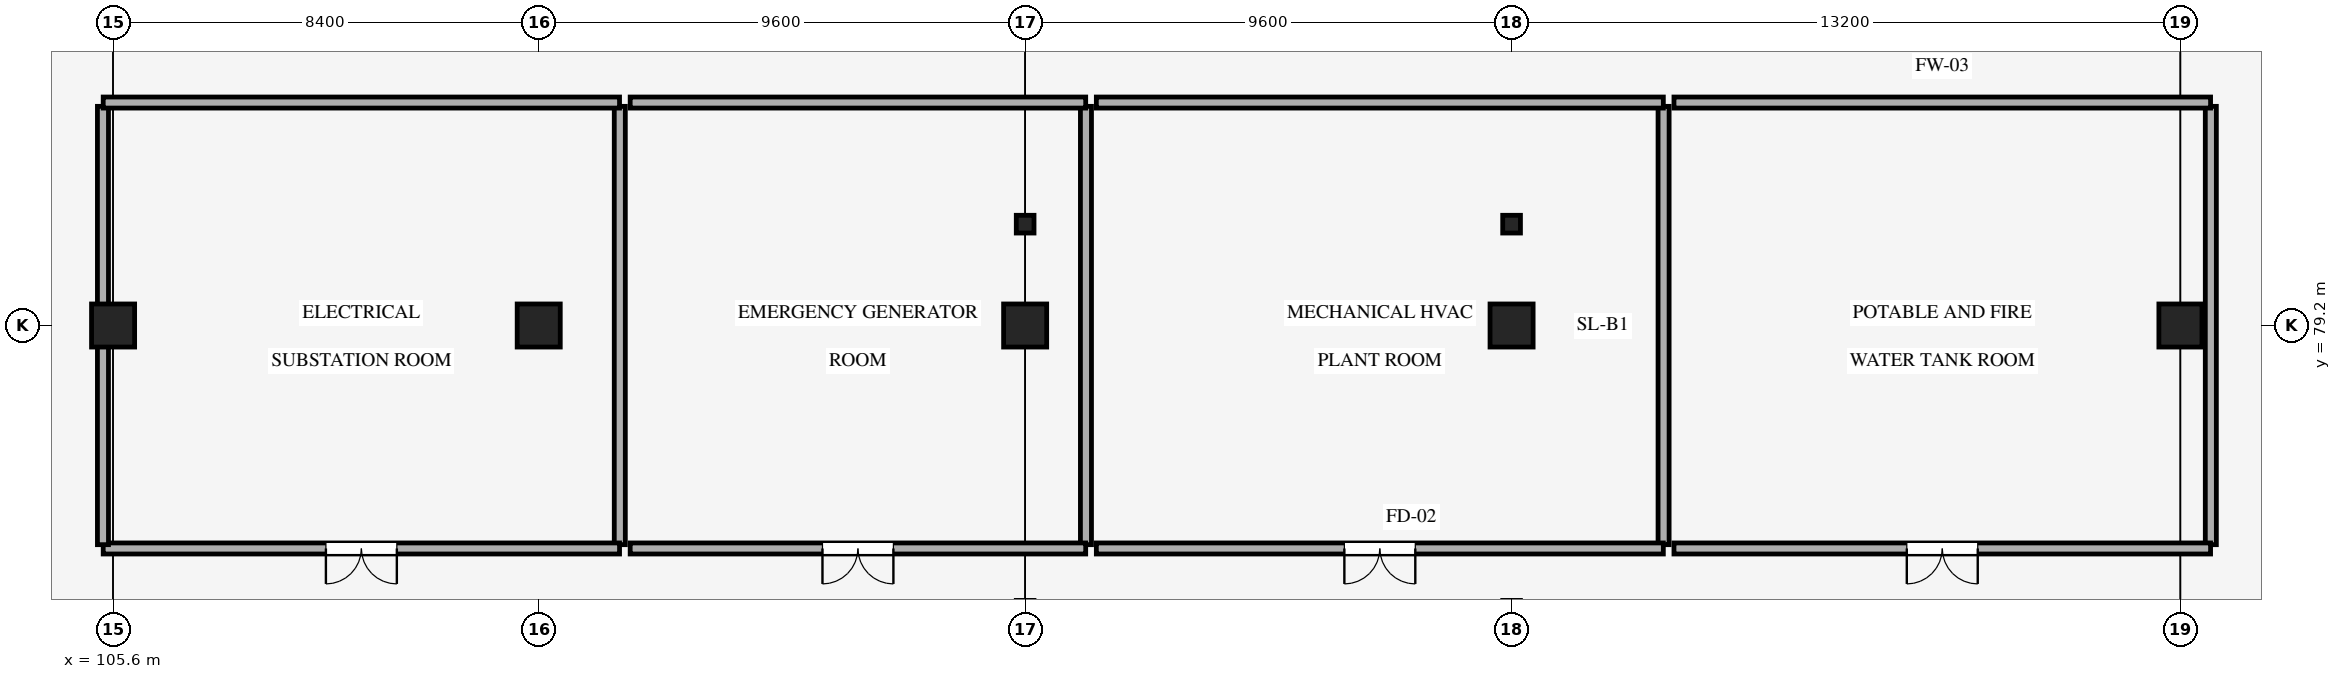
"""IFC4 building model, lengths in metres.
Left out: names, types, materials, properties, quantities, classifications, styles, units other than length and angle.
Written with IfcOpenShell. Run it as: python <this file> out.ifc"""

import sys

from ifc_helpers import new_model, si_unit, direction, frame, frame_2d, origin, origin_2d, place, context, subcontext, project, spatial, rectangle, hollow_rectangle, extrude, element, fill, save


model = new_model("IFC4")
c1 = context("Model", 3, precision=1e-05, world=origin(), true_north=direction((0.0, 1.0)))
c2 = subcontext(c1, "Body", "Model", "MODEL_VIEW")
j1 = project(units=[si_unit("LENGTHUNIT", "METRE"), si_unit("PLANEANGLEUNIT", "RADIAN")], contexts=[c1])
p1 = place(None, origin())
s1 = spatial("IfcSite", under=j1, at=p1, CompositionType="ELEMENT")
p2 = place(p1, origin())
s2 = spatial("IfcBuilding", under=s1, at=p2, CompositionType="ELEMENT")
p3 = place(p2, frame((0.0, 0.0, -4.8)))
s3 = spatial("IfcBuildingStorey", under=s2, at=p3, CompositionType="ELEMENT", Elevation=-4.8)
for number, where, z_axis, x_axis in (
    (1, (105.6, 79.2, 0.0), (0.0, 0.0, 1.0), (1.0, 0.0, 0.0)),
    (2, (114.0, 79.2, 0.0), (0.0, 0.0, 1.0), (1.0, 0.0, 0.0)),
    (3, (123.6, 79.2, 0.0), (0.0, 0.0, 1.0), (1.0, 0.0, 0.0)),
):
    element("IfcColumn", number, at=place(p3, frame(where, z_axis=z_axis, x_axis=x_axis)), inside=s3, PredefinedType="COLUMN", context=c2, shape_type="SweptSolid", body=[
        extrude(rectangle(XDim=0.85, YDim=0.85, at=origin_2d()), origin(), (0.0, 0.0, 1.0), 4.8),
    ])
p4 = place(p3, frame((123.6, 81.2, 0.0), z_axis=(0.0, 0.0, 1.0), x_axis=(1.0, 0.0, 0.0)))
e4 = element("IfcColumn", 4, at=p4, inside=s3, PredefinedType="COLUMN", context=c2, shape_type="SweptSolid", body=[
    extrude(hollow_rectangle(XDim=0.35, YDim=0.35, WallThickness=0.012, InnerFilletRadius=0.012, OuterFilletRadius=0.024, at=origin_2d()), origin(), (0.0, 0.0, 1.0), 4.8),
])
p5 = place(p3, frame((133.2, 79.2, 0.0), z_axis=(0.0, 0.0, 1.0), x_axis=(1.0, 0.0, 0.0)))
e5 = element("IfcColumn", 5, at=p5, inside=s3, PredefinedType="COLUMN", context=c2, shape_type="SweptSolid", body=[
    extrude(rectangle(XDim=0.85, YDim=0.85, at=origin_2d()), origin(), (0.0, 0.0, 1.0), 4.8),
])
p6 = place(p3, frame((133.2, 81.2, 0.0), z_axis=(0.0, 0.0, 1.0), x_axis=(1.0, 0.0, 0.0)))
e6 = element("IfcColumn", 6, at=p6, inside=s3, PredefinedType="COLUMN", context=c2, shape_type="SweptSolid", body=[
    extrude(hollow_rectangle(XDim=0.35, YDim=0.35, WallThickness=0.012, InnerFilletRadius=0.012, OuterFilletRadius=0.024, at=origin_2d()), origin(), (0.0, 0.0, 1.0), 4.8),
])
p7 = place(p3, frame((146.4, 79.2, 0.0), z_axis=(0.0, 0.0, 1.0), x_axis=(1.0, 0.0, 0.0)))
e7 = element("IfcColumn", 7, at=p7, inside=s3, PredefinedType="COLUMN", context=c2, shape_type="SweptSolid", body=[
    extrude(rectangle(XDim=0.85, YDim=0.85, at=origin_2d()), origin(), (0.0, 0.0, 1.0), 4.8),
])
p8 = place(p3, frame((115.6, 83.525, 0.0), z_axis=(0.0, 0.0, 1.0), x_axis=(0.0, -1.0, 0.0)))
e8 = element("IfcWall", 8, at=p8, inside=s3, PredefinedType="STANDARD", context=c2, shape_type="SweptSolid", body=[
    extrude(rectangle(XDim=8.65, YDim=0.218, at=frame_2d((4.325, 0.0))), origin(), (0.0, 0.0, 1.0), 3.5),
])
p9 = place(p3, frame((115.595, 74.8, 0.0), z_axis=(0.0, 0.0, 1.0), x_axis=(-1.0, 0.0, 0.0)))
e9 = element("IfcWall", 9, at=p9, inside=s3, PredefinedType="STANDARD", context=c2, shape_type="SweptSolid", body=[
    extrude(rectangle(XDim=10.19, YDim=0.218, at=frame_2d((5.095, 0.0))), origin(), (0.0, 0.0, 1.0), 4.45),
])
p10 = place(p9, frame((4.395, 0.0, 0.0)))
e10 = element("IfcOpeningElement", 10, at=p10, cuts=e9, PredefinedType="OPENING", context=c2, shape_type="SweptSolid", body=[
    extrude(rectangle(XDim=1.4, YDim=2.2, at=frame_2d((0.7, 1.1))), frame((0.0, 0.119, 0.0), z_axis=(0.0, -1.0, 0.0), x_axis=(1.0, 0.0, 0.0)), (0.0, 0.0, 1.0), 0.238),
])
p11 = place(p3, frame((105.4, 74.875, 0.0), z_axis=(0.0, 0.0, 1.0), x_axis=(0.0, 1.0, 0.0)))
e11 = element("IfcWall", 11, at=p11, inside=s3, PredefinedType="STANDARD", context=c2, shape_type="SweptSolid", body=[
    extrude(rectangle(XDim=8.65, YDim=0.218, at=frame_2d((4.325, 0.0))), origin(), (0.0, 0.0, 1.0), 3.65),
])
p12 = place(p3, frame((105.405, 83.6, 0.0), z_axis=(0.0, 0.0, 1.0), x_axis=(1.0, 0.0, 0.0)))
e12 = element("IfcWall", 12, at=p12, inside=s3, PredefinedType="STANDARD", context=c2, shape_type="SweptSolid", body=[
    extrude(rectangle(XDim=10.19, YDim=0.218, at=frame_2d((5.095, 0.0))), origin(), (0.0, 0.0, 1.0), 4.45),
])
p13 = place(p3, frame((124.8, 83.525, 0.0), z_axis=(0.0, 0.0, 1.0), x_axis=(0.0, -1.0, 0.0)))
e13 = element("IfcWall", 13, at=p13, inside=s3, PredefinedType="STANDARD", context=c2, shape_type="SweptSolid", body=[
    extrude(rectangle(XDim=8.65, YDim=0.218, at=frame_2d((4.325, 0.0))), origin(), (0.0, 0.0, 1.0), 4.185),
])
p14 = place(p3, frame((124.795, 74.8, 0.0), z_axis=(0.0, 0.0, 1.0), x_axis=(-1.0, 0.0, 0.0)))
e14 = element("IfcWall", 14, at=p14, inside=s3, PredefinedType="STANDARD", context=c2, shape_type="SweptSolid", body=[
    extrude(rectangle(XDim=8.99, YDim=0.218, at=frame_2d((4.495, 0.0))), origin(), (0.0, 0.0, 1.0), 3.735),
])
p15 = place(p14, frame((3.795, 0.0, 0.0)))
e15 = element("IfcOpeningElement", 15, at=p15, cuts=e14, PredefinedType="OPENING", context=c2, shape_type="SweptSolid", body=[
    extrude(rectangle(XDim=1.4, YDim=2.2, at=frame_2d((0.7, 1.1))), frame((0.0, 0.119, 0.0), z_axis=(0.0, -1.0, 0.0), x_axis=(1.0, 0.0, 0.0)), (0.0, 0.0, 1.0), 0.238),
])
p16 = place(p3, frame((115.805, 83.6, 0.0), z_axis=(0.0, 0.0, 1.0), x_axis=(1.0, 0.0, 0.0)))
e16 = element("IfcWall", 16, at=p16, inside=s3, PredefinedType="STANDARD", context=c2, shape_type="SweptSolid", body=[
    extrude(rectangle(XDim=8.99, YDim=0.218, at=frame_2d((4.495, 0.0))), origin(), (0.0, 0.0, 1.0), 3.735),
])
p17 = place(p3, frame((136.2, 83.525, 0.0), z_axis=(0.0, 0.0, 1.0), x_axis=(0.0, -1.0, 0.0)))
e17 = element("IfcWall", 17, at=p17, inside=s3, PredefinedType="STANDARD", context=c2, shape_type="SweptSolid", body=[
    extrude(rectangle(XDim=8.65, YDim=0.218, at=frame_2d((4.325, 0.0))), origin(), (0.0, 0.0, 1.0), 3.5),
])
p18 = place(p3, frame((136.195, 74.8, 0.0), z_axis=(0.0, 0.0, 1.0), x_axis=(-1.0, 0.0, 0.0)))
e18 = element("IfcWall", 18, at=p18, inside=s3, PredefinedType="STANDARD", context=c2, shape_type="SweptSolid", body=[
    extrude(rectangle(XDim=11.19, YDim=0.218, at=frame_2d((5.595, 0.0))), origin(), (0.0, 0.0, 1.0), 3.735),
])
p19 = place(p18, frame((4.895, 0.0, 0.0)))
e19 = element("IfcOpeningElement", 19, at=p19, cuts=e18, PredefinedType="OPENING", context=c2, shape_type="SweptSolid", body=[
    extrude(rectangle(XDim=1.4, YDim=2.2, at=frame_2d((0.7, 1.1))), frame((0.0, 0.119, 0.0), z_axis=(0.0, -1.0, 0.0), x_axis=(1.0, 0.0, 0.0)), (0.0, 0.0, 1.0), 0.238),
])
p20 = place(p3, frame((125.005, 83.6, 0.0), z_axis=(0.0, 0.0, 1.0), x_axis=(1.0, 0.0, 0.0)))
e20 = element("IfcWall", 20, at=p20, inside=s3, PredefinedType="STANDARD", context=c2, shape_type="SweptSolid", body=[
    extrude(rectangle(XDim=11.19, YDim=0.218, at=frame_2d((5.595, 0.0))), origin(), (0.0, 0.0, 1.0), 3.735),
])
p21 = place(p3, frame((147.0, 83.525, 0.0), z_axis=(0.0, 0.0, 1.0), x_axis=(0.0, -1.0, 0.0)))
e21 = element("IfcWall", 21, at=p21, inside=s3, PredefinedType="STANDARD", context=c2, shape_type="SweptSolid", body=[
    extrude(rectangle(XDim=8.65, YDim=0.218, at=frame_2d((4.325, 0.0))), origin(), (0.0, 0.0, 1.0), 4.45),
])
p22 = place(p3, frame((146.995, 74.8, 0.0), z_axis=(0.0, 0.0, 1.0), x_axis=(-1.0, 0.0, 0.0)))
e22 = element("IfcWall", 22, at=p22, inside=s3, PredefinedType="STANDARD", context=c2, shape_type="SweptSolid", body=[
    extrude(rectangle(XDim=10.59, YDim=0.218, at=frame_2d((5.295, 0.0))), origin(), (0.0, 0.0, 1.0), 4.45),
])
p23 = place(p22, frame((4.595, 0.0, 0.0)))
e23 = element("IfcOpeningElement", 23, at=p23, cuts=e22, PredefinedType="OPENING", context=c2, shape_type="SweptSolid", body=[
    extrude(rectangle(XDim=1.4, YDim=2.2, at=frame_2d((0.7, 1.1))), frame((0.0, 0.119, 0.0), z_axis=(0.0, -1.0, 0.0), x_axis=(1.0, 0.0, 0.0)), (0.0, 0.0, 1.0), 0.238),
])
p24 = place(p3, frame((136.405, 83.6, 0.0), z_axis=(0.0, 0.0, 1.0), x_axis=(1.0, 0.0, 0.0)))
e24 = element("IfcWall", 24, at=p24, inside=s3, PredefinedType="STANDARD", context=c2, shape_type="SweptSolid", body=[
    extrude(rectangle(XDim=10.59, YDim=0.218, at=frame_2d((5.295, 0.0))), origin(), (0.0, 0.0, 1.0), 4.45),
])
p25 = place(p10, origin())
e25 = element("IfcDoor", 25, at=p25, inside=s3, OperationType="DOUBLE_DOOR_SINGLE_SWING", PredefinedType="DOOR", context=c2, shape_type="SweptSolid", body=[
    extrude(rectangle(XDim=1.4, YDim=2.2, at=frame_2d((0.7, 1.1))), frame((0.0, 0.025, 0.0), z_axis=(0.0, -1.0, 0.0), x_axis=(1.0, 0.0, 0.0)), (0.0, 0.0, 1.0), 0.05),
])
fill(e10, e25)
p26 = place(p15, origin())
e26 = element("IfcDoor", 26, at=p26, inside=s3, OperationType="DOUBLE_DOOR_SINGLE_SWING", PredefinedType="DOOR", context=c2, shape_type="SweptSolid", body=[
    extrude(rectangle(XDim=1.4, YDim=2.2, at=frame_2d((0.7, 1.1))), frame((0.0, 0.025, 0.0), z_axis=(0.0, -1.0, 0.0), x_axis=(1.0, 0.0, 0.0)), (0.0, 0.0, 1.0), 0.05),
])
fill(e15, e26)
p27 = place(p19, origin())
e27 = element("IfcDoor", 27, at=p27, inside=s3, OperationType="DOUBLE_DOOR_SINGLE_SWING", PredefinedType="DOOR", context=c2, shape_type="SweptSolid", body=[
    extrude(rectangle(XDim=1.4, YDim=2.2, at=frame_2d((0.7, 1.1))), frame((0.0, 0.025, 0.0), z_axis=(0.0, -1.0, 0.0), x_axis=(1.0, 0.0, 0.0)), (0.0, 0.0, 1.0), 0.05),
])
fill(e19, e27)
p28 = place(p23, origin())
e28 = element("IfcDoor", 28, at=p28, inside=s3, OperationType="DOUBLE_DOOR_SINGLE_SWING", PredefinedType="DOOR", context=c2, shape_type="SweptSolid", body=[
    extrude(rectangle(XDim=1.4, YDim=2.2, at=frame_2d((0.7, 1.1))), frame((0.0, 0.025, 0.0), z_axis=(0.0, -1.0, 0.0), x_axis=(1.0, 0.0, 0.0)), (0.0, 0.0, 1.0), 0.05),
])
fill(e23, e28)
save(model, sys.argv[1])
